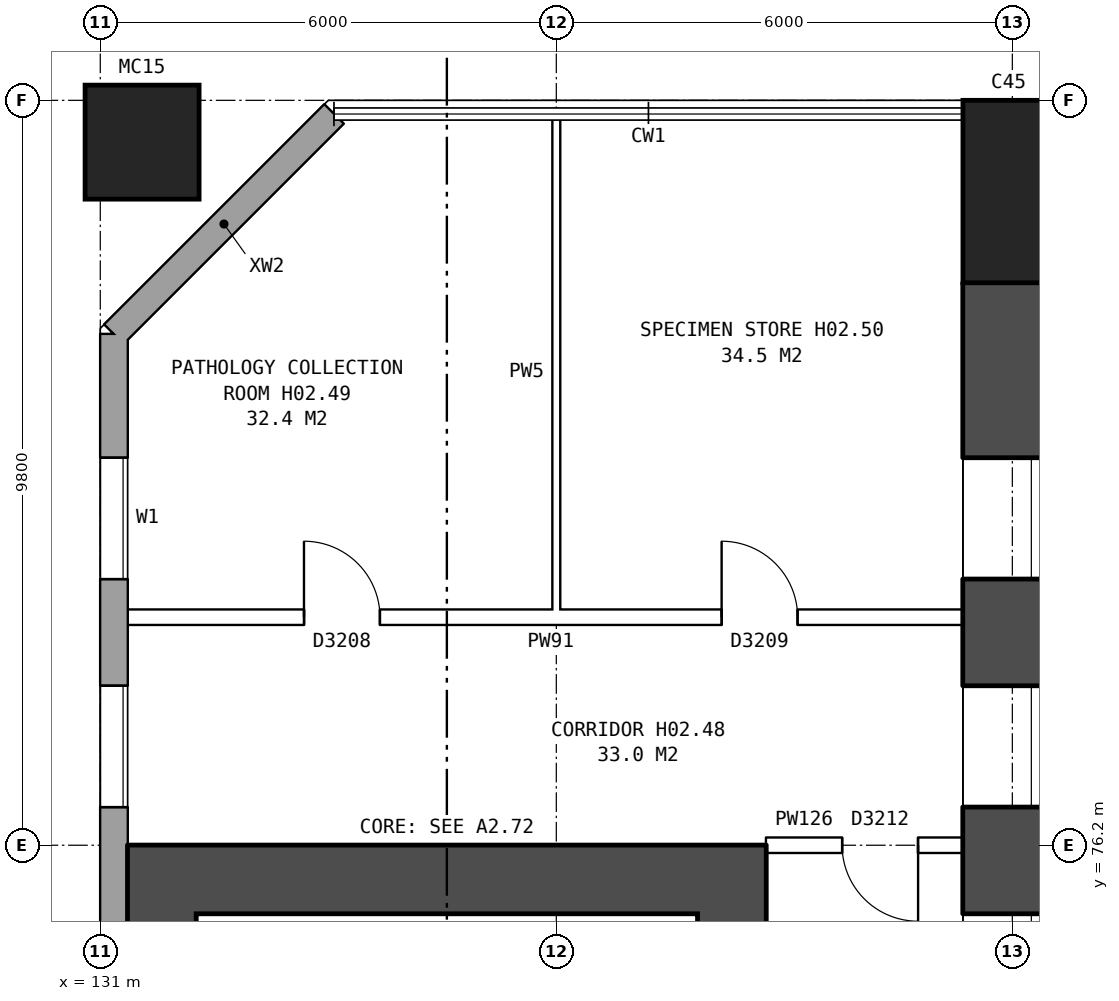
"""IFC4 building model, lengths in metres.
Left out: names, types, materials, properties, quantities, classifications, styles, units other than length and angle.
Written with IfcOpenShell. Run it as: python <this file> out.ifc"""

import sys

from ifc_helpers import new_model, si_unit, direction, frame, frame_2d, origin, origin_2d, place, context, subcontext, project, spatial, rectangle, hollow_rectangle, extrude, element, fill, save


model = new_model("IFC4")
c1 = context("Model", 3, precision=1e-05, world=origin(), true_north=direction((0.0, 1.0)))
c2 = subcontext(c1, "Body", "Model", "MODEL_VIEW")
j1 = project(units=[si_unit("LENGTHUNIT", "METRE"), si_unit("PLANEANGLEUNIT", "RADIAN")], contexts=[c1])
p1 = place(None, origin())
s1 = spatial("IfcSite", under=j1, at=p1, CompositionType="ELEMENT")
p2 = place(p1, origin())
s2 = spatial("IfcBuilding", under=s1, at=p2, CompositionType="ELEMENT")
p3 = place(p2, frame((0.0, 0.0, 10.1)))
s3 = spatial("IfcBuildingStorey", under=s2, at=p3, CompositionType="ELEMENT", Elevation=10.1)
p4 = place(p3, frame((142.95, 84.8, -0.3), z_axis=(0.0, 0.0, 1.0), x_axis=(1.0, 0.0, 0.0)))
e1 = element("IfcColumn", 1, at=p4, inside=s3, PredefinedType="COLUMN", context=c2, shape_type="SweptSolid", body=[
    extrude(rectangle(XDim=1.2, YDim=2.4, at=origin_2d()), origin(), (0.0, 0.0, 1.0), 4.4),
])
p5 = place(p3, frame((142.95, 56.4, -0.3), z_axis=(0.0, 0.0, 1.0), x_axis=(0.0, 1.0, 0.0)))
e2 = element("IfcWall", 2, at=p5, inside=s3, PredefinedType="SHEAR", context=c2, shape_type="SweptSolid", body=[
    extrude(rectangle(XDim=27.2, YDim=1.2, at=frame_2d((13.6, 0.0))), origin(), (0.0, 0.0, 1.0), 4.4),
])
p6 = place(p5, frame((2.3, 0.0, 0.8)))
e3 = element("IfcOpeningElement", 3, at=p6, cuts=e2, PredefinedType="OPENING", context=c2, shape_type="SweptSolid", body=[
    extrude(rectangle(XDim=1.6, YDim=1.8, at=frame_2d((0.8, 0.9))), frame((0.0, 0.61, 0.0), z_axis=(0.0, -1.0, 0.0), x_axis=(1.0, 0.0, 0.0)), (0.0, 0.0, 1.0), 1.22),
])
p7 = place(p5, frame((5.3, 0.0, 0.8)))
e4 = element("IfcOpeningElement", 4, at=p7, cuts=e2, PredefinedType="OPENING", context=c2, shape_type="SweptSolid", body=[
    extrude(rectangle(XDim=1.6, YDim=1.8, at=frame_2d((0.8, 0.9))), frame((0.0, 0.61, 0.0), z_axis=(0.0, -1.0, 0.0), x_axis=(1.0, 0.0, 0.0)), (0.0, 0.0, 1.0), 1.22),
])
p8 = place(p5, frame((8.3, 0.0, 0.8)))
e5 = element("IfcOpeningElement", 5, at=p8, cuts=e2, PredefinedType="OPENING", context=c2, shape_type="SweptSolid", body=[
    extrude(rectangle(XDim=1.6, YDim=1.8, at=frame_2d((0.8, 0.9))), frame((0.0, 0.61, 0.0), z_axis=(0.0, -1.0, 0.0), x_axis=(1.0, 0.0, 0.0)), (0.0, 0.0, 1.0), 1.22),
])
p9 = place(p5, frame((11.3, 0.0, 0.8)))
e6 = element("IfcOpeningElement", 6, at=p9, cuts=e2, PredefinedType="OPENING", context=c2, shape_type="SweptSolid", body=[
    extrude(rectangle(XDim=1.6, YDim=1.8, at=frame_2d((0.8, 0.9))), frame((0.0, 0.61, 0.0), z_axis=(0.0, -1.0, 0.0), x_axis=(1.0, 0.0, 0.0)), (0.0, 0.0, 1.0), 1.22),
])
p10 = place(p5, frame((14.3, 0.0, 0.8)))
e7 = element("IfcOpeningElement", 7, at=p10, cuts=e2, PredefinedType="OPENING", context=c2, shape_type="SweptSolid", body=[
    extrude(rectangle(XDim=1.6, YDim=1.8, at=frame_2d((0.8, 0.9))), frame((0.0, 0.61, 0.0), z_axis=(0.0, -1.0, 0.0), x_axis=(1.0, 0.0, 0.0)), (0.0, 0.0, 1.0), 1.22),
])
p11 = place(p5, frame((17.3, 0.0, 0.8)))
e8 = element("IfcOpeningElement", 8, at=p11, cuts=e2, PredefinedType="OPENING", context=c2, shape_type="SweptSolid", body=[
    extrude(rectangle(XDim=1.6, YDim=1.8, at=frame_2d((0.8, 0.9))), frame((0.0, 0.61, 0.0), z_axis=(0.0, -1.0, 0.0), x_axis=(1.0, 0.0, 0.0)), (0.0, 0.0, 1.0), 1.22),
])
p12 = place(p5, frame((20.3, 0.0, 0.8)))
e9 = element("IfcOpeningElement", 9, at=p12, cuts=e2, PredefinedType="OPENING", context=c2, shape_type="SweptSolid", body=[
    extrude(rectangle(XDim=1.6, YDim=1.8, at=frame_2d((0.8, 0.9))), frame((0.0, 0.61, 0.0), z_axis=(0.0, -1.0, 0.0), x_axis=(1.0, 0.0, 0.0)), (0.0, 0.0, 1.0), 1.22),
])
p13 = place(p5, frame((23.3, 0.0, 0.8)))
e10 = element("IfcOpeningElement", 10, at=p13, cuts=e2, PredefinedType="OPENING", context=c2, shape_type="SweptSolid", body=[
    extrude(rectangle(XDim=1.6, YDim=1.8, at=frame_2d((0.8, 0.9))), frame((0.0, 0.61, 0.0), z_axis=(0.0, -1.0, 0.0), x_axis=(1.0, 0.0, 0.0)), (0.0, 0.0, 1.0), 1.22),
])
p14 = place(p3, frame((131.55, 85.45, 0.0), z_axis=(0.0, 0.0, 1.0), x_axis=(1.0, 0.0, 0.0)))
e11 = element("IfcColumn", 11, at=p14, inside=s3, PredefinedType="COLUMN", context=c2, shape_type="SweptSolid", body=[
    extrude(hollow_rectangle(XDim=1.5, YDim=1.5, WallThickness=0.08, at=origin_2d()), origin(), (0.0, 0.0, 1.0), 4.6),
])
p15 = place(p3, frame((134.075, 85.82, 0.0), z_axis=(0.0, 0.0, 1.0), x_axis=(-0.707106781187, -0.707106781187, 0.0)))
e12 = element("IfcWall", 12, at=p15, inside=s3, PredefinedType="STANDARD", context=c2, shape_type="SweptSolid", body=[
    extrude(rectangle(XDim=4.094, YDim=0.36, at=frame_2d((2.047, 0.0))), origin(), (0.0, 0.0, 1.0), 4.3),
])
p16 = place(p3, frame((131.18, 82.925, 0.0), z_axis=(0.0, 0.0, 1.0), x_axis=(0.0, -1.0, 0.0)))
e13 = element("IfcWall", 13, at=p16, inside=s3, PredefinedType="STANDARD", context=c2, shape_type="SweptSolid", body=[
    extrude(rectangle(XDim=25.851, YDim=0.36, at=frame_2d((12.925, 0.0))), origin(), (0.0, 0.0, 1.0), 4.3),
])
p17 = place(p16, frame((1.625, 0.0, 0.8)))
e14 = element("IfcOpeningElement", 14, at=p17, cuts=e13, PredefinedType="OPENING", context=c2, shape_type="SweptSolid", body=[
    extrude(rectangle(XDim=1.6, YDim=1.8, at=frame_2d((0.8, 0.9))), frame((0.0, 0.19, 0.0), z_axis=(0.0, -1.0, 0.0), x_axis=(1.0, 0.0, 0.0)), (0.0, 0.0, 1.0), 0.38),
])
p18 = place(p16, frame((4.625, 0.0, 0.8)))
e15 = element("IfcOpeningElement", 15, at=p18, cuts=e13, PredefinedType="OPENING", context=c2, shape_type="SweptSolid", body=[
    extrude(rectangle(XDim=1.6, YDim=1.8, at=frame_2d((0.8, 0.9))), frame((0.0, 0.19, 0.0), z_axis=(0.0, -1.0, 0.0), x_axis=(1.0, 0.0, 0.0)), (0.0, 0.0, 1.0), 0.38),
])
p19 = place(p16, frame((19.625, 0.0, 0.8)))
e16 = element("IfcOpeningElement", 16, at=p19, cuts=e13, PredefinedType="OPENING", context=c2, shape_type="SweptSolid", body=[
    extrude(rectangle(XDim=1.6, YDim=1.8, at=frame_2d((0.8, 0.9))), frame((0.0, 0.19, 0.0), z_axis=(0.0, -1.0, 0.0), x_axis=(1.0, 0.0, 0.0)), (0.0, 0.0, 1.0), 0.38),
])
p20 = place(p16, frame((22.625, 0.0, 0.8)))
e17 = element("IfcOpeningElement", 17, at=p20, cuts=e13, PredefinedType="OPENING", context=c2, shape_type="SweptSolid", body=[
    extrude(rectangle(XDim=1.6, YDim=1.8, at=frame_2d((0.8, 0.9))), frame((0.0, 0.19, 0.0), z_axis=(0.0, -1.0, 0.0), x_axis=(1.0, 0.0, 0.0)), (0.0, 0.0, 1.0), 0.38),
])
p21 = place(p3, frame((139.31, 64.7, 0.0), z_axis=(0.0, 0.0, 1.0), x_axis=(0.0, 1.0, 0.0)))
e18 = element("IfcWall", 18, at=p21, inside=s3, PredefinedType="SHEAR", context=c2, shape_type="SweptSolid", body=[
    extrude(rectangle(XDim=10.6, YDim=0.9, at=frame_2d((5.3, 0.0))), origin(), (0.0, 0.0, 1.0), 4.3),
])
p22 = place(p21, frame((0.425, 0.0, 0.0)))
e19 = element("IfcOpeningElement", 19, at=p22, cuts=e18, PredefinedType="OPENING", context=c2, shape_type="SweptSolid", body=[
    extrude(rectangle(XDim=1.1, YDim=2.1, at=frame_2d((0.55, 1.05))), frame((0.0, 0.46, 0.0), z_axis=(0.0, -1.0, 0.0), x_axis=(1.0, 0.0, 0.0)), (0.0, 0.0, 1.0), 0.92),
])
p23 = place(p21, frame((9.0, 0.0, 0.0)))
e20 = element("IfcOpeningElement", 20, at=p23, cuts=e18, PredefinedType="OPENING", context=c2, shape_type="SweptSolid", body=[
    extrude(rectangle(XDim=1.1, YDim=2.1, at=frame_2d((0.55, 1.05))), frame((0.0, 0.46, 0.0), z_axis=(0.0, -1.0, 0.0), x_axis=(1.0, 0.0, 0.0)), (0.0, 0.0, 1.0), 0.92),
])
p24 = place(p21, frame((7.225, 0.0, 0.0)))
e21 = element("IfcOpeningElement", 21, at=p24, cuts=e18, PredefinedType="OPENING", context=c2, shape_type="SweptSolid", body=[
    extrude(rectangle(XDim=0.85, YDim=2.1, at=frame_2d((0.425, 1.05))), frame((0.0, 0.46, 0.0), z_axis=(0.0, -1.0, 0.0), x_axis=(1.0, 0.0, 0.0)), (0.0, 0.0, 1.0), 0.92),
])
p25 = place(p3, frame((131.81, 64.7, 0.0), z_axis=(0.0, 0.0, 1.0), x_axis=(0.0, 1.0, 0.0)))
e22 = element("IfcWall", 22, at=p25, inside=s3, PredefinedType="SHEAR", context=c2, shape_type="SweptSolid", body=[
    extrude(rectangle(XDim=10.6, YDim=0.9, at=frame_2d((5.3, 0.0))), origin(), (0.0, 0.0, 1.0), 4.3),
])
p26 = place(p3, frame((139.76, 75.75, 0.0), z_axis=(0.0, 0.0, 1.0), x_axis=(-1.0, 0.0, 0.0)))
e23 = element("IfcWall", 23, at=p26, inside=s3, PredefinedType="SHEAR", context=c2, shape_type="SweptSolid", body=[
    extrude(rectangle(XDim=8.4, YDim=0.9, at=frame_2d((4.2, 0.0))), origin(), (0.0, 0.0, 1.0), 4.3),
])
p27 = place(p3, frame((139.76, 76.2, 0.0), z_axis=(0.0, 0.0, 1.0), x_axis=(1.0, 0.0, 0.0)))
e24 = element("IfcWall", 24, at=p27, inside=s3, PredefinedType="PARTITIONING", context=c2, shape_type="SweptSolid", body=[
    extrude(rectangle(XDim=2.59, YDim=0.2, at=frame_2d((1.295, 0.0))), origin(), (0.0, 0.0, 1.0), 4.3),
])
p28 = place(p27, frame((1.0, 0.0, 0.0)))
e25 = element("IfcOpeningElement", 25, at=p28, cuts=e24, PredefinedType="OPENING", context=c2, shape_type="SweptSolid", body=[
    extrude(rectangle(XDim=1.0, YDim=2.1, at=frame_2d((0.5, 1.05))), frame((0.0, 0.11, 0.0), z_axis=(0.0, -1.0, 0.0), x_axis=(1.0, 0.0, 0.0)), (0.0, 0.0, 1.0), 0.22),
])
p29 = place(p3, frame((131.24, 79.2, 0.0), z_axis=(0.0, 0.0, 1.0), x_axis=(1.0, 0.0, 0.0)))
e26 = element("IfcWall", 26, at=p29, inside=s3, PredefinedType="PARTITIONING", context=c2, shape_type="SweptSolid", body=[
    extrude(rectangle(XDim=11.23, YDim=0.2, at=frame_2d((5.615, 0.0))), origin(), (0.0, 0.0, 1.0), 4.3),
])
p30 = place(p29, frame((2.44, 0.0, 0.0)))
e27 = element("IfcOpeningElement", 27, at=p30, cuts=e26, PredefinedType="OPENING", context=c2, shape_type="SweptSolid", body=[
    extrude(rectangle(XDim=1.0, YDim=2.1, at=frame_2d((0.5, 1.05))), frame((0.0, 0.11, 0.0), z_axis=(0.0, -1.0, 0.0), x_axis=(1.0, 0.0, 0.0)), (0.0, 0.0, 1.0), 0.22),
])
p31 = place(p29, frame((7.935, 0.0, 0.0)))
e28 = element("IfcOpeningElement", 28, at=p31, cuts=e26, PredefinedType="OPENING", context=c2, shape_type="SweptSolid", body=[
    extrude(rectangle(XDim=1.0, YDim=2.1, at=frame_2d((0.5, 1.05))), frame((0.0, 0.11, 0.0), z_axis=(0.0, -1.0, 0.0), x_axis=(1.0, 0.0, 0.0)), (0.0, 0.0, 1.0), 0.22),
])
p32 = place(p3, frame((137.0, 79.1, 0.0), z_axis=(0.0, 0.0, 1.0), x_axis=(0.0, 1.0, 0.0)))
e29 = element("IfcWall", 29, at=p32, inside=s3, PredefinedType="PARTITIONING", context=c2, shape_type="SweptSolid", body=[
    extrude(rectangle(XDim=6.66, YDim=0.1, at=frame_2d((3.33, 0.0))), origin(), (0.0, 0.0, 1.0), 4.3),
])
p33 = place(p17, origin())
e30 = element("IfcWindow", 30, at=p33, inside=s3, PartitioningType="SINGLE_PANEL", PredefinedType="WINDOW", context=c2, shape_type="SweptSolid", body=[
    extrude(rectangle(XDim=1.6, YDim=1.8, at=frame_2d((0.8, 0.9))), frame((0.0, 0.15, 0.0), z_axis=(0.0, -1.0, 0.0), x_axis=(1.0, 0.0, 0.0)), (0.0, 0.0, 1.0), 0.06),
])
fill(e14, e30)
p34 = place(p18, origin())
e31 = element("IfcWindow", 31, at=p34, inside=s3, PartitioningType="SINGLE_PANEL", PredefinedType="WINDOW", context=c2, shape_type="SweptSolid", body=[
    extrude(rectangle(XDim=1.6, YDim=1.8, at=frame_2d((0.8, 0.9))), frame((0.0, 0.15, 0.0), z_axis=(0.0, -1.0, 0.0), x_axis=(1.0, 0.0, 0.0)), (0.0, 0.0, 1.0), 0.06),
])
fill(e15, e31)
p35 = place(p11, origin())
e32 = element("IfcWindow", 32, at=p35, inside=s3, PartitioningType="SINGLE_PANEL", PredefinedType="WINDOW", context=c2, shape_type="SweptSolid", body=[
    extrude(rectangle(XDim=1.6, YDim=1.8, at=frame_2d((0.8, 0.9))), frame((0.0, -0.27, 0.0), z_axis=(0.0, -1.0, 0.0), x_axis=(1.0, 0.0, 0.0)), (0.0, 0.0, 1.0), 0.06),
])
fill(e8, e32)
p36 = place(p12, origin())
e33 = element("IfcWindow", 33, at=p36, inside=s3, PartitioningType="SINGLE_PANEL", PredefinedType="WINDOW", context=c2, shape_type="SweptSolid", body=[
    extrude(rectangle(XDim=1.6, YDim=1.8, at=frame_2d((0.8, 0.9))), frame((0.0, -0.27, 0.0), z_axis=(0.0, -1.0, 0.0), x_axis=(1.0, 0.0, 0.0)), (0.0, 0.0, 1.0), 0.06),
])
fill(e9, e33)
p37 = place(p13, origin())
e34 = element("IfcWindow", 34, at=p37, inside=s3, PartitioningType="SINGLE_PANEL", PredefinedType="WINDOW", context=c2, shape_type="SweptSolid", body=[
    extrude(rectangle(XDim=1.6, YDim=1.8, at=frame_2d((0.8, 0.9))), frame((0.0, -0.27, 0.0), z_axis=(0.0, -1.0, 0.0), x_axis=(1.0, 0.0, 0.0)), (0.0, 0.0, 1.0), 0.06),
])
fill(e10, e34)
p38 = place(p28, frame((1.0, 0.0, 0.0), z_axis=(0.0, 0.0, 1.0), x_axis=(-1.0, 0.0, 0.0)))
e35 = element("IfcDoor", 35, at=p38, inside=s3, OperationType="SINGLE_SWING_LEFT", PredefinedType="DOOR", context=c2, shape_type="SweptSolid", body=[
    extrude(rectangle(XDim=1.0, YDim=2.1, at=frame_2d((0.5, 1.05))), frame((0.0, 0.025, 0.0), z_axis=(0.0, -1.0, 0.0), x_axis=(1.0, 0.0, 0.0)), (0.0, 0.0, 1.0), 0.05),
])
fill(e25, e35)
p39 = place(p30, origin())
e36 = element("IfcDoor", 36, at=p39, inside=s3, OperationType="SINGLE_SWING_LEFT", PredefinedType="DOOR", context=c2, shape_type="SweptSolid", body=[
    extrude(rectangle(XDim=1.0, YDim=2.1, at=frame_2d((0.5, 1.05))), frame((0.0, 0.025, 0.0), z_axis=(0.0, -1.0, 0.0), x_axis=(1.0, 0.0, 0.0)), (0.0, 0.0, 1.0), 0.05),
])
fill(e27, e36)
p40 = place(p31, origin())
e37 = element("IfcDoor", 37, at=p40, inside=s3, OperationType="SINGLE_SWING_LEFT", PredefinedType="DOOR", context=c2, shape_type="SweptSolid", body=[
    extrude(rectangle(XDim=1.0, YDim=2.1, at=frame_2d((0.5, 1.05))), frame((0.0, 0.025, 0.0), z_axis=(0.0, -1.0, 0.0), x_axis=(1.0, 0.0, 0.0)), (0.0, 0.0, 1.0), 0.05),
])
fill(e28, e37)
save(model, sys.argv[1])
